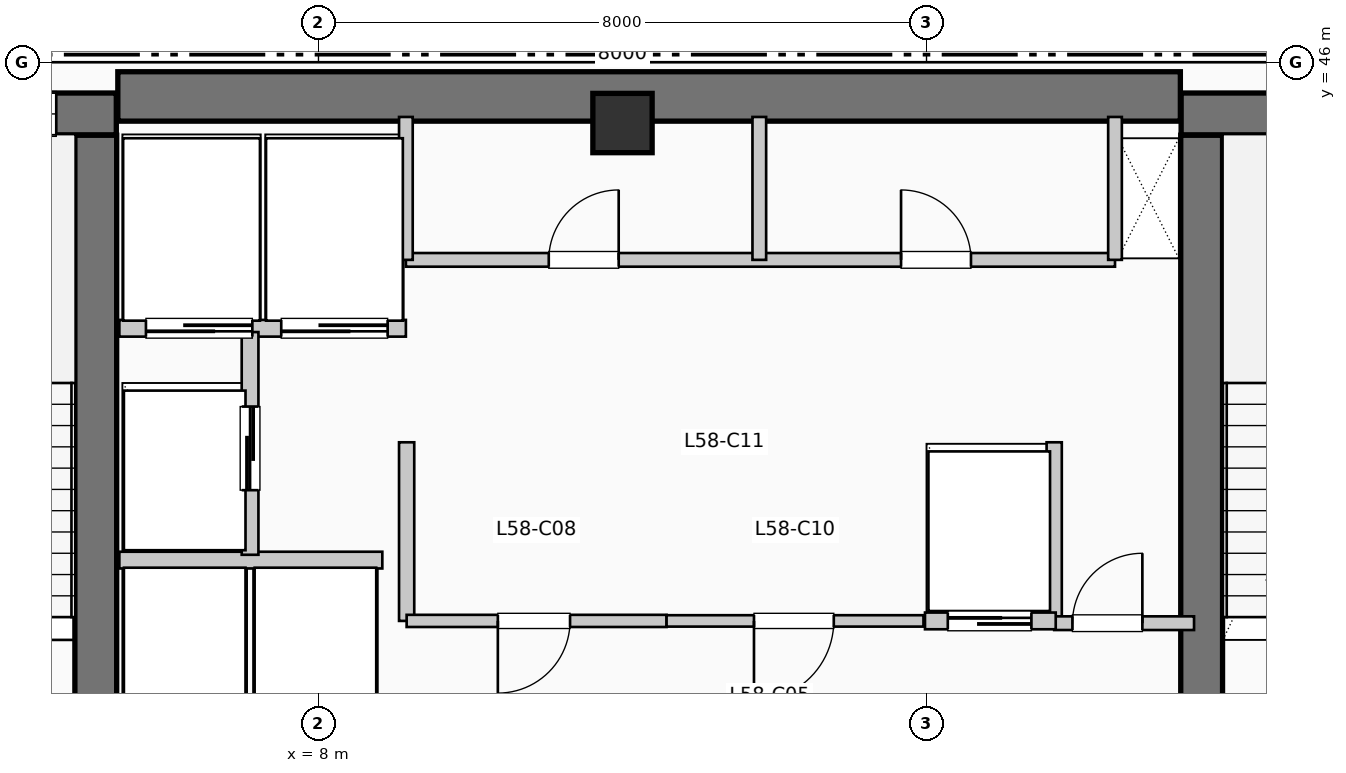
"""IFC4 building model, lengths in metres.
Left out: names, types, materials, properties, quantities, classifications, styles, units other than length and angle.
Written with IfcOpenShell. Run it as: python <this file> out.ifc"""

import sys

from ifc_helpers import new_model, si_unit, direction, frame, frame_2d, origin, origin_2d, place, context, subcontext, project, spatial, rectangle, extrude, element, fill, save


model = new_model("IFC4")
c1 = context("Model", 3, precision=1e-05, world=origin(), true_north=direction((0.0, 1.0)))
c2 = subcontext(c1, "Body", "Model", "MODEL_VIEW")
j1 = project(units=[si_unit("LENGTHUNIT", "METRE"), si_unit("PLANEANGLEUNIT", "RADIAN")], contexts=[c1])
p1 = place(None, origin())
s1 = spatial("IfcSite", under=j1, at=p1, CompositionType="ELEMENT")
p2 = place(p1, origin())
s2 = spatial("IfcBuilding", under=s1, at=p2, CompositionType="ELEMENT")
p3 = place(p2, frame((0.0, 0.0, 239.58)))
s3 = spatial("IfcBuildingStorey", under=s2, at=p3, CompositionType="ELEMENT", Elevation=239.58)
p4 = place(p3, frame((5.36, 45.55, 0.0), z_axis=(0.0, 0.0, 1.0), x_axis=(1.0, 0.0, 0.0)))
e1 = element("IfcWall", 1, at=p4, inside=s3, PredefinedType="SHEAR", context=c2, shape_type="SweptSolid", body=[
    extrude(rectangle(XDim=13.98, YDim=0.65, at=frame_2d((6.99, 0.0))), origin(), (0.0, 0.0, 1.0), 3.96),
])
p5 = place(p3, frame((5.07, 37.15, 0.0), z_axis=(0.0, 0.0, 1.0), x_axis=(0.0, 1.0, 0.0)))
e2 = element("IfcWall", 2, at=p5, inside=s3, PredefinedType="SHEAR", context=c2, shape_type="SweptSolid", body=[
    extrude(rectangle(XDim=7.89, YDim=0.55, at=frame_2d((3.945, 0.0))), origin(), (0.0, 0.0, 1.0), 3.96),
])
p6 = place(p3, frame((1.1, 45.32, 0.0), z_axis=(0.0, 0.0, 1.0), x_axis=(1.0, 0.0, 0.0)))
e3 = element("IfcWall", 3, at=p6, inside=s3, PredefinedType="SHEAR", context=c2, shape_type="SweptSolid", body=[
    extrude(rectangle(XDim=4.24, YDim=0.55, at=frame_2d((2.12, 0.0))), origin(), (0.0, 0.0, 1.0), 3.96),
])
p7 = place(p6, frame((2.05, 0.0, 1.05)))
e4 = element("IfcOpeningElement", 4, at=p7, cuts=e3, PredefinedType="OPENING", context=c2, shape_type="SweptSolid", body=[
    extrude(rectangle(XDim=1.4, YDim=1.8, at=frame_2d((0.7, 0.9))), frame((0.0, 0.285, 0.0), z_axis=(0.0, -1.0, 0.0), x_axis=(1.0, 0.0, 0.0)), (0.0, 0.0, 1.0), 0.57),
])
p8 = place(p3, frame((19.62, 37.15, 0.0), z_axis=(0.0, 0.0, 1.0), x_axis=(0.0, 1.0, 0.0)))
e5 = element("IfcWall", 5, at=p8, inside=s3, PredefinedType="SHEAR", context=c2, shape_type="SweptSolid", body=[
    extrude(rectangle(XDim=7.89, YDim=0.55, at=frame_2d((3.945, 0.0))), origin(), (0.0, 0.0, 1.0), 3.96),
])
p9 = place(p3, frame((19.35, 45.32, 0.0), z_axis=(0.0, 0.0, 1.0), x_axis=(1.0, 0.0, 0.0)))
e6 = element("IfcWall", 6, at=p9, inside=s3, PredefinedType="SHEAR", context=c2, shape_type="SweptSolid", body=[
    extrude(rectangle(XDim=3.69, YDim=0.55, at=frame_2d((1.845, 0.0))), origin(), (0.0, 0.0, 1.0), 3.96),
])
p10 = place(p9, frame((1.15, 0.0, 1.05)))
e7 = element("IfcOpeningElement", 7, at=p10, cuts=e6, PredefinedType="OPENING", context=c2, shape_type="SweptSolid", body=[
    extrude(rectangle(XDim=1.4, YDim=1.8, at=frame_2d((0.7, 0.9))), frame((0.0, 0.285, 0.0), z_axis=(0.0, -1.0, 0.0), x_axis=(1.0, 0.0, 0.0)), (0.0, 0.0, 1.0), 0.57),
])
p11 = place(p3, frame((12.0, 45.2, 0.0), z_axis=(0.0, 0.0, 1.0), x_axis=(1.0, 0.0, 0.0)))
e8 = element("IfcColumn", 8, at=p11, inside=s3, PredefinedType="COLUMN", context=c2, shape_type="SweptSolid", body=[
    extrude(rectangle(XDim=0.78, YDim=0.78, at=origin_2d()), origin(), (0.0, 0.0, 1.0), 3.96),
])
p12 = place(p3, frame((5.38, 39.45, 0.0), z_axis=(0.0, 0.0, 1.0), x_axis=(1.0, 0.0, 0.0)))
e9 = element("IfcWall", 9, at=p12, inside=s3, PredefinedType="PARTITIONING", context=c2, shape_type="SweptSolid", body=[
    extrude(rectangle(XDim=3.46, YDim=0.22, at=frame_2d((1.73, 0.0))), origin(), (0.0, 0.0, 1.0), 3.71),
])
p13 = place(p3, frame((5.38, 42.5, 0.0), z_axis=(0.0, 0.0, 1.0), x_axis=(1.0, 0.0, 0.0)))
e10 = element("IfcWall", 10, at=p13, inside=s3, PredefinedType="PARTITIONING", context=c2, shape_type="SweptSolid", body=[
    extrude(rectangle(XDim=3.77, YDim=0.22, at=frame_2d((1.885, 0.0))), origin(), (0.0, 0.0, 1.0), 3.71),
])
p14 = place(p13, frame((1.75, 0.0, 0.0), z_axis=(0.0, 0.0, 1.0), x_axis=(-1.0, 0.0, 0.0)))
e11 = element("IfcOpeningElement", 11, at=p14, cuts=e10, PredefinedType="OPENING", context=c2, shape_type="SweptSolid", body=[
    extrude(rectangle(XDim=1.4, YDim=2.2, at=frame_2d((0.7, 1.1))), frame((0.0, 0.12, 0.0), z_axis=(0.0, -1.0, 0.0), x_axis=(1.0, 0.0, 0.0)), (0.0, 0.0, 1.0), 0.24),
])
p15 = place(p13, frame((3.53, 0.0, 0.0), z_axis=(0.0, 0.0, 1.0), x_axis=(-1.0, 0.0, 0.0)))
e12 = element("IfcOpeningElement", 12, at=p15, cuts=e10, PredefinedType="OPENING", context=c2, shape_type="SweptSolid", body=[
    extrude(rectangle(XDim=1.4, YDim=2.2, at=frame_2d((0.7, 1.1))), frame((0.0, 0.12, 0.0), z_axis=(0.0, -1.0, 0.0), x_axis=(1.0, 0.0, 0.0)), (0.0, 0.0, 1.0), 0.24),
])
p16 = place(p3, frame((7.1, 39.52, 0.0), z_axis=(0.0, 0.0, 1.0), x_axis=(0.0, 1.0, 0.0)))
e13 = element("IfcWall", 13, at=p16, inside=s3, PredefinedType="PARTITIONING", context=c2, shape_type="SweptSolid", body=[
    extrude(rectangle(XDim=2.93, YDim=0.22, at=frame_2d((1.465, 0.0))), origin(), (0.0, 0.0, 1.0), 3.71),
])
p17 = place(p16, frame((0.85, 0.0, 0.0)))
e14 = element("IfcOpeningElement", 14, at=p17, cuts=e13, PredefinedType="OPENING", context=c2, shape_type="SweptSolid", body=[
    extrude(rectangle(XDim=1.1, YDim=2.2, at=frame_2d((0.55, 1.1))), frame((0.0, 0.12, 0.0), z_axis=(0.0, -1.0, 0.0), x_axis=(1.0, 0.0, 0.0)), (0.0, 0.0, 1.0), 0.24),
])
for number, where, z_axis, x_axis in (
    (15, (9.16, 38.65, 0.0), (0.0, 0.0, 1.0), (0.0, 1.0, 0.0)),
    (16, (17.68, 38.65, 0.0), (0.0, 0.0, 1.0), (0.0, 1.0, 0.0)),
):
    element("IfcWall", number, at=place(p3, frame(where, z_axis=z_axis, x_axis=x_axis)), inside=s3, PredefinedType="PARTITIONING", context=c2, shape_type="SweptSolid", body=[
        extrude(rectangle(XDim=2.35, YDim=0.2, at=frame_2d((1.175, 0.0))), origin(), (0.0, 0.0, 1.0), 3.71),
    ])
p18 = place(p3, frame((17.68, 38.62, 0.0), z_axis=(0.0, 0.0, 1.0), x_axis=(1.0, 0.0, 0.0)))
e17 = element("IfcWall", 17, at=p18, inside=s3, PredefinedType="PARTITIONING", context=c2, shape_type="SweptSolid", body=[
    extrude(rectangle(XDim=1.84, YDim=0.18, at=frame_2d((0.92, 0.0))), origin(), (0.0, 0.0, 1.0), 3.71),
])
p19 = place(p18, frame((0.24, 0.0, 0.0)))
e18 = element("IfcOpeningElement", 18, at=p19, cuts=e17, PredefinedType="OPENING", context=c2, shape_type="SweptSolid", body=[
    extrude(rectangle(XDim=0.92, YDim=2.1, at=frame_2d((0.46, 1.05))), frame((0.0, 0.1, 0.0), z_axis=(0.0, -1.0, 0.0), x_axis=(1.0, 0.0, 0.0)), (0.0, 0.0, 1.0), 0.2),
])
p20 = place(p3, frame((9.16, 38.65, 0.0), z_axis=(0.0, 0.0, 1.0), x_axis=(1.0, 0.0, 0.0)))
e19 = element("IfcWall", 19, at=p20, inside=s3, PredefinedType="PARTITIONING", context=c2, shape_type="SweptSolid", body=[
    extrude(rectangle(XDim=3.42, YDim=0.16, at=frame_2d((1.71, 0.0))), origin(), (0.0, 0.0, 1.0), 3.71),
])
p21 = place(p20, frame((2.15, 0.0, 0.0), z_axis=(0.0, 0.0, 1.0), x_axis=(-1.0, 0.0, 0.0)))
e20 = element("IfcOpeningElement", 20, at=p21, cuts=e19, PredefinedType="OPENING", context=c2, shape_type="SweptSolid", body=[
    extrude(rectangle(XDim=0.95, YDim=2.15, at=frame_2d((0.475, 1.075))), frame((0.0, 0.09, 0.0), z_axis=(0.0, -1.0, 0.0), x_axis=(1.0, 0.0, 0.0)), (0.0, 0.0, 1.0), 0.18),
])
p22 = place(p3, frame((12.58, 38.65, 0.0), z_axis=(0.0, 0.0, 1.0), x_axis=(1.0, 0.0, 0.0)))
e21 = element("IfcWall", 21, at=p22, inside=s3, PredefinedType="PARTITIONING", context=c2, shape_type="SweptSolid", body=[
    extrude(rectangle(XDim=3.38, YDim=0.15, at=frame_2d((1.69, 0.0))), origin(), (0.0, 0.0, 1.0), 3.71),
])
p23 = place(p22, frame((2.2, 0.0, 0.0), z_axis=(0.0, 0.0, 1.0), x_axis=(-1.0, 0.0, 0.0)))
e22 = element("IfcOpeningElement", 22, at=p23, cuts=e21, PredefinedType="OPENING", context=c2, shape_type="SweptSolid", body=[
    extrude(rectangle(XDim=1.05, YDim=2.15, at=frame_2d((0.525, 1.075))), frame((0.0, 0.085, 0.0), z_axis=(0.0, -1.0, 0.0), x_axis=(1.0, 0.0, 0.0)), (0.0, 0.0, 1.0), 0.17),
])
p24 = place(p3, frame((15.98, 38.65, 0.0), z_axis=(0.0, 0.0, 1.0), x_axis=(1.0, 0.0, 0.0)))
e23 = element("IfcWall", 23, at=p24, inside=s3, PredefinedType="PARTITIONING", context=c2, shape_type="SweptSolid", body=[
    extrude(rectangle(XDim=1.72, YDim=0.22, at=frame_2d((0.86, 0.0))), origin(), (0.0, 0.0, 1.0), 3.71),
])
p25 = place(p24, frame((0.3, 0.0, 0.0)))
e24 = element("IfcOpeningElement", 24, at=p25, cuts=e23, PredefinedType="OPENING", context=c2, shape_type="SweptSolid", body=[
    extrude(rectangle(XDim=1.1, YDim=2.2, at=frame_2d((0.55, 1.1))), frame((0.0, 0.12, 0.0), z_axis=(0.0, -1.0, 0.0), x_axis=(1.0, 0.0, 0.0)), (0.0, 0.0, 1.0), 0.24),
])
p26 = place(p3, frame((9.15, 43.4, 0.0), z_axis=(0.0, 0.0, 1.0), x_axis=(1.0, 0.0, 0.0)))
e25 = element("IfcWall", 25, at=p26, inside=s3, PredefinedType="PLUMBINGWALL", context=c2, shape_type="SweptSolid", body=[
    extrude(rectangle(XDim=9.33, YDim=0.18, at=frame_2d((4.665, 0.0))), origin(), (0.0, 0.0, 1.0), 3.71),
])
p27 = place(p26, frame((1.88, 0.0, 0.0)))
e26 = element("IfcOpeningElement", 26, at=p27, cuts=e25, PredefinedType="OPENING", context=c2, shape_type="SweptSolid", body=[
    extrude(rectangle(XDim=0.92, YDim=2.1, at=frame_2d((0.46, 1.05))), frame((0.0, 0.1, 0.0), z_axis=(0.0, -1.0, 0.0), x_axis=(1.0, 0.0, 0.0)), (0.0, 0.0, 1.0), 0.2),
])
p28 = place(p26, frame((6.515, 0.0, 0.0)))
e27 = element("IfcOpeningElement", 27, at=p28, cuts=e25, PredefinedType="OPENING", context=c2, shape_type="SweptSolid", body=[
    extrude(rectangle(XDim=0.92, YDim=2.1, at=frame_2d((0.46, 1.05))), frame((0.0, 0.1, 0.0), z_axis=(0.0, -1.0, 0.0), x_axis=(1.0, 0.0, 0.0)), (0.0, 0.0, 1.0), 0.2),
])
for number, where, z_axis, x_axis in (
    (28, (9.15, 43.4, 0.0), (0.0, 0.0, 1.0), (0.0, 1.0, 0.0)),
    (29, (18.48, 43.4, 0.0), (0.0, 0.0, 1.0), (0.0, 1.0, 0.0)),
    (30, (13.8, 43.4, 0.0), (0.0, 0.0, 1.0), (0.0, 1.0, 0.0)),
):
    element("IfcWall", number, at=place(p3, frame(where, z_axis=z_axis, x_axis=x_axis)), inside=s3, PredefinedType="PLUMBINGWALL", context=c2, shape_type="SweptSolid", body=[
        extrude(rectangle(XDim=1.88, YDim=0.18, at=frame_2d((0.94, 0.0))), origin(), (0.0, 0.0, 1.0), 3.71),
    ])
p29 = place(p7, origin())
e31 = element("IfcWindow", 31, at=p29, inside=s3, PartitioningType="SINGLE_PANEL", PredefinedType="WINDOW", context=c2, shape_type="SweptSolid", body=[
    extrude(rectangle(XDim=1.4, YDim=1.8, at=frame_2d((0.7, 0.9))), frame((0.0, 0.03, 0.0), z_axis=(0.0, -1.0, 0.0), x_axis=(1.0, 0.0, 0.0)), (0.0, 0.0, 1.0), 0.06),
])
fill(e4, e31)
p30 = place(p14, origin())
e32 = element("IfcDoor", 32, at=p30, inside=s3, OperationType="SLIDING_TO_LEFT", PredefinedType="DOOR", context=c2, shape_type="SweptSolid", body=[
    extrude(rectangle(XDim=1.4, YDim=2.2, at=frame_2d((0.7, 1.1))), frame((0.0, 0.025, 0.0), z_axis=(0.0, -1.0, 0.0), x_axis=(1.0, 0.0, 0.0)), (0.0, 0.0, 1.0), 0.05),
])
fill(e11, e32)
p31 = place(p15, origin())
e33 = element("IfcDoor", 33, at=p31, inside=s3, OperationType="SLIDING_TO_LEFT", PredefinedType="DOOR", context=c2, shape_type="SweptSolid", body=[
    extrude(rectangle(XDim=1.4, YDim=2.2, at=frame_2d((0.7, 1.1))), frame((0.0, 0.025, 0.0), z_axis=(0.0, -1.0, 0.0), x_axis=(1.0, 0.0, 0.0)), (0.0, 0.0, 1.0), 0.05),
])
fill(e12, e33)
p32 = place(p17, origin())
e34 = element("IfcDoor", 34, at=p32, inside=s3, OperationType="SLIDING_TO_LEFT", PredefinedType="DOOR", context=c2, shape_type="SweptSolid", body=[
    extrude(rectangle(XDim=1.1, YDim=2.2, at=frame_2d((0.55, 1.1))), frame((0.0, 0.025, 0.0), z_axis=(0.0, -1.0, 0.0), x_axis=(1.0, 0.0, 0.0)), (0.0, 0.0, 1.0), 0.05),
])
fill(e14, e34)
p33 = place(p19, origin())
e35 = element("IfcDoor", 35, at=p33, inside=s3, OperationType="SINGLE_SWING_RIGHT", PredefinedType="DOOR", context=c2, shape_type="SweptSolid", body=[
    extrude(rectangle(XDim=0.92, YDim=2.1, at=frame_2d((0.46, 1.05))), frame((0.0, 0.025, 0.0), z_axis=(0.0, -1.0, 0.0), x_axis=(1.0, 0.0, 0.0)), (0.0, 0.0, 1.0), 0.05),
])
fill(e18, e35)
p34 = place(p21, origin())
e36 = element("IfcDoor", 36, at=p34, inside=s3, OperationType="SINGLE_SWING_LEFT", PredefinedType="DOOR", context=c2, shape_type="SweptSolid", body=[
    extrude(rectangle(XDim=0.95, YDim=2.15, at=frame_2d((0.475, 1.075))), frame((0.0, 0.025, 0.0), z_axis=(0.0, -1.0, 0.0), x_axis=(1.0, 0.0, 0.0)), (0.0, 0.0, 1.0), 0.05),
])
fill(e20, e36)
p35 = place(p23, origin())
e37 = element("IfcDoor", 37, at=p35, inside=s3, OperationType="SINGLE_SWING_LEFT", PredefinedType="DOOR", context=c2, shape_type="SweptSolid", body=[
    extrude(rectangle(XDim=1.05, YDim=2.15, at=frame_2d((0.525, 1.075))), frame((0.0, 0.025, 0.0), z_axis=(0.0, -1.0, 0.0), x_axis=(1.0, 0.0, 0.0)), (0.0, 0.0, 1.0), 0.05),
])
fill(e22, e37)
p36 = place(p25, origin())
e38 = element("IfcDoor", 38, at=p36, inside=s3, OperationType="SLIDING_TO_LEFT", PredefinedType="DOOR", context=c2, shape_type="SweptSolid", body=[
    extrude(rectangle(XDim=1.1, YDim=2.2, at=frame_2d((0.55, 1.1))), frame((0.0, 0.025, 0.0), z_axis=(0.0, -1.0, 0.0), x_axis=(1.0, 0.0, 0.0)), (0.0, 0.0, 1.0), 0.05),
])
fill(e24, e38)
p37 = place(p27, origin())
e39 = element("IfcDoor", 39, at=p37, inside=s3, OperationType="SINGLE_SWING_RIGHT", PredefinedType="DOOR", context=c2, shape_type="SweptSolid", body=[
    extrude(rectangle(XDim=0.92, YDim=2.1, at=frame_2d((0.46, 1.05))), frame((0.0, 0.025, 0.0), z_axis=(0.0, -1.0, 0.0), x_axis=(1.0, 0.0, 0.0)), (0.0, 0.0, 1.0), 0.05),
])
fill(e26, e39)
p38 = place(p28, origin())
e40 = element("IfcDoor", 40, at=p38, inside=s3, OperationType="SINGLE_SWING_LEFT", PredefinedType="DOOR", context=c2, shape_type="SweptSolid", body=[
    extrude(rectangle(XDim=0.92, YDim=2.1, at=frame_2d((0.46, 1.05))), frame((0.0, 0.025, 0.0), z_axis=(0.0, -1.0, 0.0), x_axis=(1.0, 0.0, 0.0)), (0.0, 0.0, 1.0), 0.05),
])
fill(e27, e40)
save(model, sys.argv[1])
